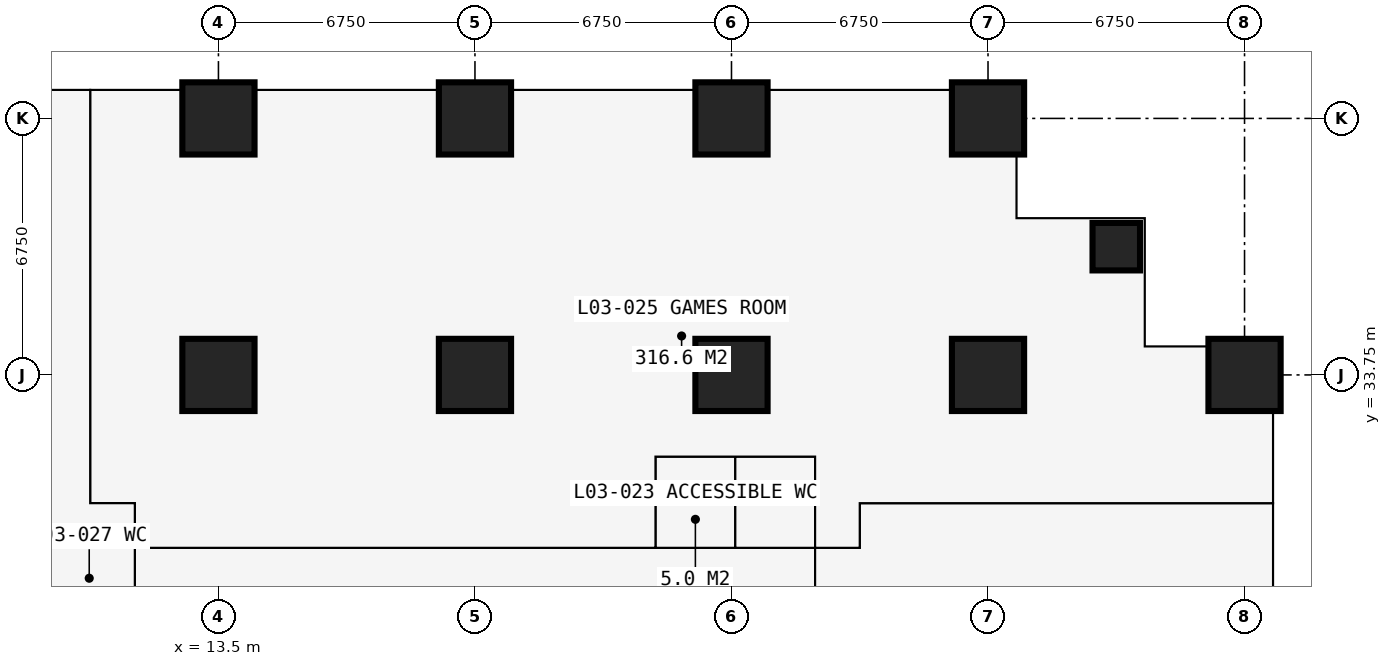
"""IFC4 building model, lengths in metres.
Left out: names, types, materials, properties, quantities, classifications, styles, units other than length and angle.
Written with IfcOpenShell. Run it as: python <this file> out.ifc"""

import sys

from ifc_helpers import new_model, si_unit, direction, frame, frame_2d, origin, origin_2d, place, context, subcontext, project, spatial, rectangle, extrude, element, fill, save


model = new_model("IFC4")
c1 = context("Model", 3, precision=1e-05, world=origin(), true_north=direction((0.0, 1.0)))
c2 = subcontext(c1, "Body", "Model", "MODEL_VIEW")
j1 = project(units=[si_unit("LENGTHUNIT", "METRE"), si_unit("PLANEANGLEUNIT", "RADIAN")], contexts=[c1])
p1 = place(None, origin())
s1 = spatial("IfcSite", under=j1, at=p1, CompositionType="ELEMENT")
p2 = place(p1, origin())
s2 = spatial("IfcBuilding", under=s1, at=p2, CompositionType="ELEMENT")
p3 = place(p2, frame((0.0, 0.0, 13.5)))
s3 = spatial("IfcBuildingStorey", under=s2, at=p3, CompositionType="ELEMENT", Elevation=13.5)
for number, where, z_axis, x_axis in (
    (1, (13.5, 33.75, 0.0), (0.0, 0.0, 1.0), (1.0, 0.0, 0.0)),
    (2, (13.5, 40.5, 0.0), (0.0, 0.0, 1.0), (1.0, 0.0, 0.0)),
    (3, (20.25, 33.75, 0.0), (0.0, 0.0, 1.0), (1.0, 0.0, 0.0)),
    (4, (20.25, 40.5, 0.0), (0.0, 0.0, 1.0), (1.0, 0.0, 0.0)),
    (5, (27.0, 33.75, 0.0), (0.0, 0.0, 1.0), (1.0, 0.0, 0.0)),
    (6, (27.0, 40.5, 0.0), (0.0, 0.0, 1.0), (1.0, 0.0, 0.0)),
    (7, (33.75, 33.75, 0.0), (0.0, 0.0, 1.0), (1.0, 0.0, 0.0)),
    (8, (33.75, 40.5, 0.0), (0.0, 0.0, 1.0), (1.0, 0.0, 0.0)),
):
    element("IfcColumn", number, at=place(p3, frame(where, z_axis=z_axis, x_axis=x_axis)), inside=s3, PredefinedType="COLUMN", context=c2, shape_type="SweptSolid", body=[
        extrude(rectangle(XDim=1.9, YDim=1.9, at=origin_2d()), origin(), (0.0, 0.0, 1.0), 4.5),
    ])
p4 = place(p3, frame((37.125, 37.125, 0.0), z_axis=(0.0, 0.0, 1.0), x_axis=(1.0, 0.0, 0.0)))
e9 = element("IfcColumn", 9, at=p4, inside=s3, PredefinedType="COLUMN", context=c2, shape_type="SweptSolid", body=[
    extrude(rectangle(XDim=1.25, YDim=1.25, at=origin_2d()), origin(), (0.0, 0.0, 1.0), 4.5),
])
p5 = place(p3, frame((40.5, 33.75, 0.0), z_axis=(0.0, 0.0, 1.0), x_axis=(1.0, 0.0, 0.0)))
e10 = element("IfcColumn", 10, at=p5, inside=s3, PredefinedType="COLUMN", context=c2, shape_type="SweptSolid", body=[
    extrude(rectangle(XDim=1.9, YDim=1.9, at=origin_2d()), origin(), (0.0, 0.0, 1.0), 4.5),
])
p6 = place(p3, frame((41.25, 34.5, 0.0), z_axis=(0.0, 0.0, 1.0), x_axis=(-1.0, 0.0, 0.0)))
e11 = element("IfcWall", 11, at=p6, inside=s3, PredefinedType="SOLIDWALL", context=c2, shape_type="SweptSolid", body=[
    extrude(rectangle(XDim=3.375, YDim=0.3, at=frame_2d((1.688, 0.0))), origin(), (0.0, 0.0, 1.0), 4.275),
])
p7 = place(p6, frame((1.857, 0.0, 0.9)))
e12 = element("IfcOpeningElement", 12, at=p7, cuts=e11, PredefinedType="OPENING", context=c2, shape_type="SweptSolid", body=[
    extrude(rectangle(XDim=1.2, YDim=1.8, at=frame_2d((0.6, 0.9))), frame((0.0, 0.16, 0.0), z_axis=(0.0, -1.0, 0.0), x_axis=(1.0, 0.0, 0.0)), (0.0, 0.0, 1.0), 0.32),
])
p8 = place(p3, frame((37.875, 34.5, 0.0), z_axis=(0.0, 0.0, 1.0), x_axis=(0.0, 1.0, 0.0)))
e13 = element("IfcWall", 13, at=p8, inside=s3, PredefinedType="SOLIDWALL", context=c2, shape_type="SweptSolid", body=[
    extrude(rectangle(XDim=3.375, YDim=0.3, at=frame_2d((1.688, 0.0))), origin(), (0.0, 0.0, 1.0), 4.275),
])
p9 = place(p8, frame((0.938, 0.0, 0.9)))
e14 = element("IfcOpeningElement", 14, at=p9, cuts=e13, PredefinedType="OPENING", context=c2, shape_type="SweptSolid", body=[
    extrude(rectangle(XDim=1.5, YDim=1.8, at=frame_2d((0.75, 0.9))), frame((0.0, 0.16, 0.0), z_axis=(0.0, -1.0, 0.0), x_axis=(1.0, 0.0, 0.0)), (0.0, 0.0, 1.0), 0.32),
])
p10 = place(p3, frame((37.875, 37.875, 0.0), z_axis=(0.0, 0.0, 1.0), x_axis=(-1.0, 0.0, 0.0)))
e15 = element("IfcWall", 15, at=p10, inside=s3, PredefinedType="SOLIDWALL", context=c2, shape_type="SweptSolid", body=[
    extrude(rectangle(XDim=3.375, YDim=0.3, at=frame_2d((1.688, 0.0))), origin(), (0.0, 0.0, 1.0), 4.275),
])
p11 = place(p10, frame((0.938, 0.0, 0.9)))
e16 = element("IfcOpeningElement", 16, at=p11, cuts=e15, PredefinedType="OPENING", context=c2, shape_type="SweptSolid", body=[
    extrude(rectangle(XDim=1.5, YDim=1.8, at=frame_2d((0.75, 0.9))), frame((0.0, 0.16, 0.0), z_axis=(0.0, -1.0, 0.0), x_axis=(1.0, 0.0, 0.0)), (0.0, 0.0, 1.0), 0.32),
])
p12 = place(p3, frame((34.5, 37.875, 0.0), z_axis=(0.0, 0.0, 1.0), x_axis=(0.0, 1.0, 0.0)))
e17 = element("IfcWall", 17, at=p12, inside=s3, PredefinedType="SOLIDWALL", context=c2, shape_type="SweptSolid", body=[
    extrude(rectangle(XDim=3.375, YDim=0.3, at=frame_2d((1.688, 0.0))), origin(), (0.0, 0.0, 1.0), 4.275),
])
p13 = place(p12, frame((0.317, 0.0, 0.9)))
e18 = element("IfcOpeningElement", 18, at=p13, cuts=e17, PredefinedType="OPENING", context=c2, shape_type="SweptSolid", body=[
    extrude(rectangle(XDim=1.2, YDim=1.8, at=frame_2d((0.6, 0.9))), frame((0.0, 0.16, 0.0), z_axis=(0.0, -1.0, 0.0), x_axis=(1.0, 0.0, 0.0)), (0.0, 0.0, 1.0), 0.32),
])
p14 = place(p3, frame((8.9, 29.2, 0.0), z_axis=(0.0, 0.0, 1.0), x_axis=(1.0, 0.0, 0.0)))
e19 = element("IfcWall", 19, at=p14, inside=s3, PredefinedType="PARTITIONING", context=c2, shape_type="SweptSolid", body=[
    extrude(rectangle(XDim=21.475, YDim=0.15, at=frame_2d((10.738, 0.0))), origin(), (0.0, 0.0, 1.0), 4.275),
])
p15 = place(p14, frame((16.65, 0.0, 0.0)))
e20 = element("IfcOpeningElement", 20, at=p15, cuts=e19, PredefinedType="OPENING", context=c2, shape_type="SweptSolid", body=[
    extrude(rectangle(XDim=1.0, YDim=2.2, at=frame_2d((0.5, 1.1))), frame((0.0, 0.085, 0.0), z_axis=(0.0, -1.0, 0.0), x_axis=(1.0, 0.0, 0.0)), (0.0, 0.0, 1.0), 0.17),
])
p16 = place(p14, frame((18.75, 0.0, 0.0)))
e21 = element("IfcOpeningElement", 21, at=p16, cuts=e19, PredefinedType="OPENING", context=c2, shape_type="SweptSolid", body=[
    extrude(rectangle(XDim=1.0, YDim=2.2, at=frame_2d((0.5, 1.1))), frame((0.0, 0.085, 0.0), z_axis=(0.0, -1.0, 0.0), x_axis=(1.0, 0.0, 0.0)), (0.0, 0.0, 1.0), 0.17),
])
p17 = place(p14, frame((8.45, 0.0, 0.0)))
e22 = element("IfcOpeningElement", 22, at=p17, cuts=e19, PredefinedType="OPENING", context=c2, shape_type="SweptSolid", body=[
    extrude(rectangle(XDim=1.6, YDim=2.4, at=frame_2d((0.8, 1.2))), frame((0.0, 0.085, 0.0), z_axis=(0.0, -1.0, 0.0), x_axis=(1.0, 0.0, 0.0)), (0.0, 0.0, 1.0), 0.17),
])
p18 = place(p3, frame((10.125, 30.375, 0.0), z_axis=(0.0, 0.0, 1.0), x_axis=(0.0, 1.0, 0.0)))
e23 = element("IfcWall", 23, at=p18, inside=s3, PredefinedType="PARTITIONING", context=c2, shape_type="SweptSolid", body=[
    extrude(rectangle(XDim=10.859, YDim=0.15, at=frame_2d((5.429, 0.0))), origin(), (0.0, 0.0, 1.0), 4.275),
])
p19 = place(p3, frame((10.125, 30.375, 0.0), z_axis=(0.0, 0.0, 1.0), x_axis=(1.0, 0.0, 0.0)))
e24 = element("IfcWall", 24, at=p19, inside=s3, PredefinedType="PARTITIONING", context=c2, shape_type="SweptSolid", body=[
    extrude(rectangle(XDim=1.175, YDim=0.15, at=frame_2d((0.587, 0.0))), origin(), (0.0, 0.0, 1.0), 4.275),
])
p20 = place(p3, frame((11.3, 8.9, 0.0), z_axis=(0.0, 0.0, 1.0), x_axis=(0.0, 1.0, 0.0)))
e25 = element("IfcWall", 25, at=p20, inside=s3, PredefinedType="PARTITIONING", context=c2, shape_type="SweptSolid", body=[
    extrude(rectangle(XDim=21.475, YDim=0.15, at=frame_2d((10.738, 0.0))), origin(), (0.0, 0.0, 1.0), 4.275),
])
p21 = place(p20, frame((16.65, 0.0, 0.0)))
e26 = element("IfcOpeningElement", 26, at=p21, cuts=e25, PredefinedType="OPENING", context=c2, shape_type="SweptSolid", body=[
    extrude(rectangle(XDim=1.0, YDim=2.2, at=frame_2d((0.5, 1.1))), frame((0.0, 0.085, 0.0), z_axis=(0.0, -1.0, 0.0), x_axis=(1.0, 0.0, 0.0)), (0.0, 0.0, 1.0), 0.17),
])
p22 = place(p20, frame((18.75, 0.0, 0.0)))
e27 = element("IfcOpeningElement", 27, at=p22, cuts=e25, PredefinedType="OPENING", context=c2, shape_type="SweptSolid", body=[
    extrude(rectangle(XDim=1.0, YDim=2.2, at=frame_2d((0.5, 1.1))), frame((0.0, 0.085, 0.0), z_axis=(0.0, -1.0, 0.0), x_axis=(1.0, 0.0, 0.0)), (0.0, 0.0, 1.0), 0.17),
])
p23 = place(p20, frame((8.45, 0.0, 0.0)))
e28 = element("IfcOpeningElement", 28, at=p23, cuts=e25, PredefinedType="OPENING", context=c2, shape_type="SweptSolid", body=[
    extrude(rectangle(XDim=1.6, YDim=2.4, at=frame_2d((0.8, 1.2))), frame((0.0, 0.085, 0.0), z_axis=(0.0, -1.0, 0.0), x_axis=(1.0, 0.0, 0.0)), (0.0, 0.0, 1.0), 0.17),
])
p24 = place(p3, frame((25.0, 29.2, 0.0), z_axis=(0.0, 0.0, 1.0), x_axis=(0.0, 1.0, 0.0)))
e29 = element("IfcWall", 29, at=p24, inside=s3, PredefinedType="PARTITIONING", context=c2, shape_type="SweptSolid", body=[
    extrude(rectangle(XDim=2.4, YDim=0.1, at=frame_2d((1.2, 0.0))), origin(), (0.0, 0.0, 1.0), 4.275),
])
p25 = place(p3, frame((25.0, 31.6, 0.0), z_axis=(0.0, 0.0, 1.0), x_axis=(1.0, 0.0, 0.0)))
e30 = element("IfcWall", 30, at=p25, inside=s3, PredefinedType="PARTITIONING", context=c2, shape_type="SweptSolid", body=[
    extrude(rectangle(XDim=4.2, YDim=0.15, at=frame_2d((2.1, 0.0))), origin(), (0.0, 0.0, 1.0), 4.275),
])
p26 = place(p3, frame((27.1, 29.2, 0.0), z_axis=(0.0, 0.0, 1.0), x_axis=(0.0, 1.0, 0.0)))
e31 = element("IfcWall", 31, at=p26, inside=s3, PredefinedType="PARTITIONING", context=c2, shape_type="SweptSolid", body=[
    extrude(rectangle(XDim=2.4, YDim=0.1, at=frame_2d((1.2, 0.0))), origin(), (0.0, 0.0, 1.0), 3.777),
])
p27 = place(p3, frame((29.2, 11.3, 0.0), z_axis=(0.0, 0.0, 1.0), x_axis=(0.0, 1.0, 0.0)))
e32 = element("IfcWall", 32, at=p27, inside=s3, PredefinedType="PARTITIONING", context=c2, shape_type="SweptSolid", body=[
    extrude(rectangle(XDim=20.3, YDim=0.15, at=frame_2d((10.15, 0.0))), origin(), (0.0, 0.0, 1.0), 4.275),
])
p28 = place(p27, frame((15.35, 0.0, 0.0)))
e33 = element("IfcOpeningElement", 33, at=p28, cuts=e32, PredefinedType="OPENING", context=c2, shape_type="SweptSolid", body=[
    extrude(rectangle(XDim=1.6, YDim=2.4, at=frame_2d((0.8, 1.2))), frame((0.0, 0.085, 0.0), z_axis=(0.0, -1.0, 0.0), x_axis=(1.0, 0.0, 0.0)), (0.0, 0.0, 1.0), 0.17),
])
p29 = place(p27, frame((8.35, 0.0, 0.0)))
e34 = element("IfcOpeningElement", 34, at=p29, cuts=e32, PredefinedType="OPENING", context=c2, shape_type="SweptSolid", body=[
    extrude(rectangle(XDim=1.2, YDim=2.2, at=frame_2d((0.6, 1.1))), frame((0.0, 0.085, 0.0), z_axis=(0.0, -1.0, 0.0), x_axis=(1.0, 0.0, 0.0)), (0.0, 0.0, 1.0), 0.17),
])
p30 = place(p3, frame((30.375, 29.2, 0.0), z_axis=(0.0, 0.0, 1.0), x_axis=(0.0, 1.0, 0.0)))
e35 = element("IfcWall", 35, at=p30, inside=s3, PredefinedType="PARTITIONING", context=c2, shape_type="SweptSolid", body=[
    extrude(rectangle(XDim=1.175, YDim=0.15, at=frame_2d((0.587, 0.0))), origin(), (0.0, 0.0, 1.0), 4.275),
])
p31 = place(p3, frame((30.375, 30.375, 0.0), z_axis=(0.0, 0.0, 1.0), x_axis=(1.0, 0.0, 0.0)))
e36 = element("IfcWall", 36, at=p31, inside=s3, PredefinedType="PARTITIONING", context=c2, shape_type="SweptSolid", body=[
    extrude(rectangle(XDim=10.859, YDim=0.15, at=frame_2d((5.429, 0.0))), origin(), (0.0, 0.0, 1.0), 4.275),
])
p32 = place(p7, origin())
e37 = element("IfcWindow", 37, at=p32, inside=s3, PartitioningType="SINGLE_PANEL", PredefinedType="WINDOW", context=c2, shape_type="SweptSolid", body=[
    extrude(rectangle(XDim=1.2, YDim=1.8, at=frame_2d((0.6, 0.9))), frame((0.0, 0.03, 0.0), z_axis=(0.0, -1.0, 0.0), x_axis=(1.0, 0.0, 0.0)), (0.0, 0.0, 1.0), 0.06),
])
fill(e12, e37)
p33 = place(p9, origin())
e38 = element("IfcWindow", 38, at=p33, inside=s3, PartitioningType="SINGLE_PANEL", PredefinedType="WINDOW", context=c2, shape_type="SweptSolid", body=[
    extrude(rectangle(XDim=1.5, YDim=1.8, at=frame_2d((0.75, 0.9))), frame((0.0, 0.03, 0.0), z_axis=(0.0, -1.0, 0.0), x_axis=(1.0, 0.0, 0.0)), (0.0, 0.0, 1.0), 0.06),
])
fill(e14, e38)
p34 = place(p11, origin())
e39 = element("IfcWindow", 39, at=p34, inside=s3, PartitioningType="SINGLE_PANEL", PredefinedType="WINDOW", context=c2, shape_type="SweptSolid", body=[
    extrude(rectangle(XDim=1.5, YDim=1.8, at=frame_2d((0.75, 0.9))), frame((0.0, 0.03, 0.0), z_axis=(0.0, -1.0, 0.0), x_axis=(1.0, 0.0, 0.0)), (0.0, 0.0, 1.0), 0.06),
])
fill(e16, e39)
p35 = place(p13, origin())
e40 = element("IfcWindow", 40, at=p35, inside=s3, PartitioningType="SINGLE_PANEL", PredefinedType="WINDOW", context=c2, shape_type="SweptSolid", body=[
    extrude(rectangle(XDim=1.2, YDim=1.8, at=frame_2d((0.6, 0.9))), frame((0.0, 0.03, 0.0), z_axis=(0.0, -1.0, 0.0), x_axis=(1.0, 0.0, 0.0)), (0.0, 0.0, 1.0), 0.06),
])
fill(e18, e40)
p36 = place(p28, origin())
e41 = element("IfcDoor", 41, at=p36, inside=s3, OperationType="DOUBLE_DOOR_SINGLE_SWING", PredefinedType="DOOR", context=c2, shape_type="SweptSolid", body=[
    extrude(rectangle(XDim=1.6, YDim=2.4, at=frame_2d((0.8, 1.2))), frame((0.0, 0.025, 0.0), z_axis=(0.0, -1.0, 0.0), x_axis=(1.0, 0.0, 0.0)), (0.0, 0.0, 1.0), 0.05),
])
fill(e33, e41)
p37 = place(p15, origin())
e42 = element("IfcDoor", 42, at=p37, inside=s3, OperationType="SINGLE_SWING_LEFT", PredefinedType="DOOR", context=c2, shape_type="SweptSolid", body=[
    extrude(rectangle(XDim=1.0, YDim=2.2, at=frame_2d((0.5, 1.1))), frame((0.0, 0.025, 0.0), z_axis=(0.0, -1.0, 0.0), x_axis=(1.0, 0.0, 0.0)), (0.0, 0.0, 1.0), 0.05),
])
fill(e20, e42)
p38 = place(p16, origin())
e43 = element("IfcDoor", 43, at=p38, inside=s3, OperationType="SINGLE_SWING_LEFT", PredefinedType="DOOR", context=c2, shape_type="SweptSolid", body=[
    extrude(rectangle(XDim=1.0, YDim=2.2, at=frame_2d((0.5, 1.1))), frame((0.0, 0.025, 0.0), z_axis=(0.0, -1.0, 0.0), x_axis=(1.0, 0.0, 0.0)), (0.0, 0.0, 1.0), 0.05),
])
fill(e21, e43)
p39 = place(p17, origin())
e44 = element("IfcDoor", 44, at=p39, inside=s3, OperationType="DOUBLE_DOOR_SINGLE_SWING", PredefinedType="DOOR", context=c2, shape_type="SweptSolid", body=[
    extrude(rectangle(XDim=1.6, YDim=2.4, at=frame_2d((0.8, 1.2))), frame((0.0, 0.025, 0.0), z_axis=(0.0, -1.0, 0.0), x_axis=(1.0, 0.0, 0.0)), (0.0, 0.0, 1.0), 0.05),
])
fill(e22, e44)
p40 = place(p22, origin())
e45 = element("IfcDoor", 45, at=p40, inside=s3, OperationType="SINGLE_SWING_LEFT", PredefinedType="DOOR", context=c2, shape_type="SweptSolid", body=[
    extrude(rectangle(XDim=1.0, YDim=2.2, at=frame_2d((0.5, 1.1))), frame((0.0, 0.025, 0.0), z_axis=(0.0, -1.0, 0.0), x_axis=(1.0, 0.0, 0.0)), (0.0, 0.0, 1.0), 0.05),
])
fill(e27, e45)
save(model, sys.argv[1])
